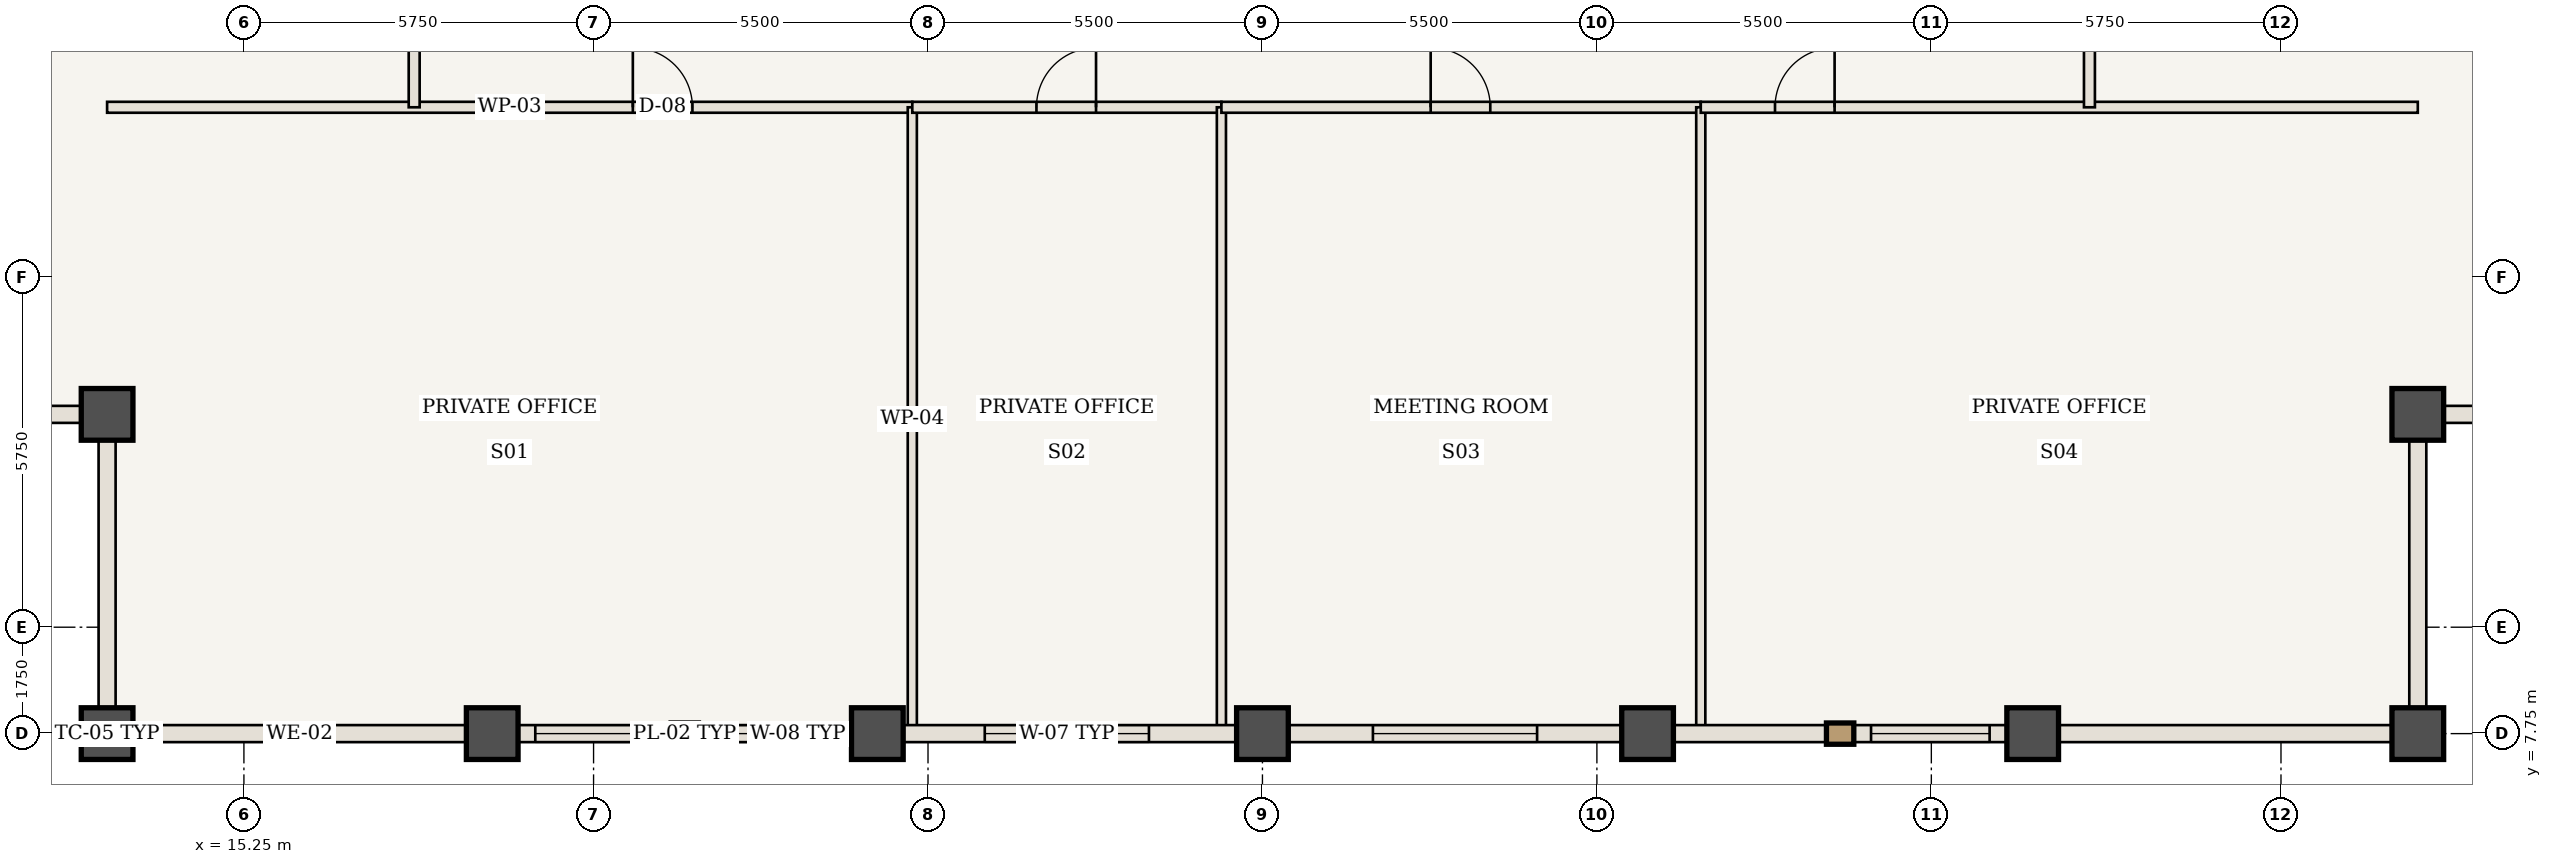
"""IFC4 building model, lengths in metres.
Left out: names, types, materials, properties, quantities, classifications, styles, units other than length and angle.
Written with IfcOpenShell. Run it as: python <this file> out.ifc"""

import sys

from ifc_helpers import new_model, si_unit, direction, frame, frame_2d, origin, origin_2d, place, context, subcontext, project, spatial, rectangle, extrude, element, fill, save


model = new_model("IFC4")
c1 = context("Model", 3, precision=1e-05, world=origin(), true_north=direction((0.0, 1.0)))
c2 = subcontext(c1, "Body", "Model", "MODEL_VIEW")
j1 = project(units=[si_unit("LENGTHUNIT", "METRE"), si_unit("PLANEANGLEUNIT", "RADIAN")], contexts=[c1])
p1 = place(None, origin())
s1 = spatial("IfcSite", under=j1, at=p1, CompositionType="ELEMENT")
p2 = place(p1, origin())
s2 = spatial("IfcBuilding", under=s1, at=p2, CompositionType="ELEMENT")
p3 = place(p2, frame((0.0, 0.0, 198.45)))
s3 = spatial("IfcBuildingStorey", under=s2, at=p3, CompositionType="ELEMENT", Elevation=198.45)
for number, where, z_axis, x_axis in (
    (1, (13.0, 7.75, 0.0), (0.0, 0.0, 1.0), (1.0, 0.0, 0.0)),
    (2, (13.0, 13.0, 0.0), (0.0, 0.0, 1.0), (1.0, 0.0, 0.0)),
    (3, (51.0, 7.75, 0.0), (0.0, 0.0, 1.0), (1.0, 0.0, 0.0)),
    (4, (51.0, 13.0, 0.0), (0.0, 0.0, 1.0), (1.0, 0.0, 0.0)),
    (5, (19.333, 7.75, 0.0), (0.0, 0.0, 1.0), (1.0, 0.0, 0.0)),
    (6, (25.667, 7.75, 0.0), (0.0, 0.0, 1.0), (1.0, 0.0, 0.0)),
    (7, (32.0, 7.75, 0.0), (0.0, 0.0, 1.0), (1.0, 0.0, 0.0)),
    (8, (38.333, 7.75, 0.0), (0.0, 0.0, 1.0), (1.0, 0.0, 0.0)),
    (9, (44.667, 7.75, 0.0), (0.0, 0.0, 1.0), (1.0, 0.0, 0.0)),
):
    element("IfcColumn", number, at=place(p3, frame(where, z_axis=z_axis, x_axis=x_axis)), inside=s3, PredefinedType="COLUMN", context=c2, shape_type="SweptSolid", body=[
        extrude(rectangle(XDim=0.85, YDim=0.85, at=origin_2d()), origin(), (0.0, 0.0, 1.0), 3.85),
    ])
p4 = place(p3, frame((13.0, 18.05, 0.0), z_axis=(0.0, 0.0, 1.0), x_axis=(1.0, 0.0, 0.0)))
e10 = element("IfcWall", 10, at=p4, inside=s3, PredefinedType="STANDARD", context=c2, shape_type="SweptSolid", body=[
    extrude(rectangle(XDim=13.242, YDim=0.18, at=frame_2d((6.621, 0.0))), origin(), (0.0, 0.0, 1.0), 3.685),
])
p5 = place(p4, frame((8.646, 0.0, 0.0)))
e11 = element("IfcOpeningElement", 11, at=p5, cuts=e10, PredefinedType="OPENING", context=c2, shape_type="SweptSolid", body=[
    extrude(rectangle(XDim=0.98, YDim=2.2, at=frame_2d((0.49, 1.1))), frame((0.0, 0.1, 0.0), z_axis=(0.0, -1.0, 0.0), x_axis=(1.0, 0.0, 0.0)), (0.0, 0.0, 1.0), 0.2),
])
p6 = place(p3, frame((26.242, 7.81, 0.0), z_axis=(0.0, 0.0, 1.0), x_axis=(0.0, 1.0, 0.0)))
e12 = element("IfcWall", 12, at=p6, inside=s3, PredefinedType="STANDARD", context=c2, shape_type="SweptSolid", body=[
    extrude(rectangle(XDim=10.24, YDim=0.15, at=frame_2d((5.12, 0.0))), origin(), (0.0, 0.0, 1.0), 3.685),
])
p7 = place(p3, frame((26.242, 18.05, 0.0), z_axis=(0.0, 0.0, 1.0), x_axis=(1.0, 0.0, 0.0)))
e13 = element("IfcWall", 13, at=p7, inside=s3, PredefinedType="STANDARD", context=c2, shape_type="SweptSolid", body=[
    extrude(rectangle(XDim=5.083, YDim=0.18, at=frame_2d((2.542, 0.0))), origin(), (0.0, 0.0, 1.0), 3.685),
])
p8 = place(p7, frame((2.042, 0.0, 0.0)))
e14 = element("IfcOpeningElement", 14, at=p8, cuts=e13, PredefinedType="OPENING", context=c2, shape_type="SweptSolid", body=[
    extrude(rectangle(XDim=0.98, YDim=2.2, at=frame_2d((0.49, 1.1))), frame((0.0, 0.1, 0.0), z_axis=(0.0, -1.0, 0.0), x_axis=(1.0, 0.0, 0.0)), (0.0, 0.0, 1.0), 0.2),
])
p9 = place(p3, frame((31.325, 7.81, 0.0), z_axis=(0.0, 0.0, 1.0), x_axis=(0.0, 1.0, 0.0)))
e15 = element("IfcWall", 15, at=p9, inside=s3, PredefinedType="STANDARD", context=c2, shape_type="SweptSolid", body=[
    extrude(rectangle(XDim=10.24, YDim=0.15, at=frame_2d((5.12, 0.0))), origin(), (0.0, 0.0, 1.0), 3.685),
])
p10 = place(p3, frame((31.325, 18.05, 0.0), z_axis=(0.0, 0.0, 1.0), x_axis=(1.0, 0.0, 0.0)))
e16 = element("IfcWall", 16, at=p10, inside=s3, PredefinedType="STANDARD", context=c2, shape_type="SweptSolid", body=[
    extrude(rectangle(XDim=7.883, YDim=0.18, at=frame_2d((3.942, 0.0))), origin(), (0.0, 0.0, 1.0), 3.685),
])
p11 = place(p10, frame((3.442, 0.0, 0.0)))
e17 = element("IfcOpeningElement", 17, at=p11, cuts=e16, PredefinedType="OPENING", context=c2, shape_type="SweptSolid", body=[
    extrude(rectangle(XDim=0.98, YDim=2.2, at=frame_2d((0.49, 1.1))), frame((0.0, 0.1, 0.0), z_axis=(0.0, -1.0, 0.0), x_axis=(1.0, 0.0, 0.0)), (0.0, 0.0, 1.0), 0.2),
])
p12 = place(p3, frame((39.208, 7.81, 0.0), z_axis=(0.0, 0.0, 1.0), x_axis=(0.0, 1.0, 0.0)))
e18 = element("IfcWall", 18, at=p12, inside=s3, PredefinedType="STANDARD", context=c2, shape_type="SweptSolid", body=[
    extrude(rectangle(XDim=10.24, YDim=0.15, at=frame_2d((5.12, 0.0))), origin(), (0.0, 0.0, 1.0), 3.685),
])
p13 = place(p3, frame((39.208, 18.05, 0.0), z_axis=(0.0, 0.0, 1.0), x_axis=(1.0, 0.0, 0.0)))
e19 = element("IfcWall", 19, at=p13, inside=s3, PredefinedType="STANDARD", context=c2, shape_type="SweptSolid", body=[
    extrude(rectangle(XDim=11.792, YDim=0.18, at=frame_2d((5.896, 0.0))), origin(), (0.0, 0.0, 1.0), 3.685),
])
p14 = place(p13, frame((1.221, 0.0, 0.0)))
e20 = element("IfcOpeningElement", 20, at=p14, cuts=e19, PredefinedType="OPENING", context=c2, shape_type="SweptSolid", body=[
    extrude(rectangle(XDim=0.98, YDim=2.2, at=frame_2d((0.49, 1.1))), frame((0.0, 0.1, 0.0), z_axis=(0.0, -1.0, 0.0), x_axis=(1.0, 0.0, 0.0)), (0.0, 0.0, 1.0), 0.2),
])
p15 = place(p3, frame((18.05, 18.05, 0.0), z_axis=(0.0, 0.0, 1.0), x_axis=(0.0, 1.0, 0.0)))
e21 = element("IfcWall", 21, at=p15, inside=s3, PredefinedType="STANDARD", context=c2, shape_type="SweptSolid", body=[
    extrude(rectangle(XDim=12.825, YDim=0.18, at=frame_2d((6.413, 0.0))), origin(), (0.0, 0.0, 1.0), 3.685),
])
p16 = place(p15, frame((5.913, 0.0, 0.0)))
e22 = element("IfcOpeningElement", 22, at=p16, cuts=e21, PredefinedType="OPENING", context=c2, shape_type="SweptSolid", body=[
    extrude(rectangle(XDim=0.98, YDim=2.2, at=frame_2d((0.49, 1.1))), frame((0.0, 0.1, 0.0), z_axis=(0.0, -1.0, 0.0), x_axis=(1.0, 0.0, 0.0)), (0.0, 0.0, 1.0), 0.2),
])
p17 = place(p3, frame((45.6, 18.05, 0.0), z_axis=(0.0, 0.0, 1.0), x_axis=(0.0, 1.0, 0.0)))
e23 = element("IfcWall", 23, at=p17, inside=s3, PredefinedType="STANDARD", context=c2, shape_type="SweptSolid", body=[
    extrude(rectangle(XDim=12.7, YDim=0.18, at=frame_2d((6.35, 0.0))), origin(), (0.0, 0.0, 1.0), 3.685),
])
p18 = place(p17, frame((5.85, 0.0, 0.0)))
e24 = element("IfcOpeningElement", 24, at=p18, cuts=e23, PredefinedType="OPENING", context=c2, shape_type="SweptSolid", body=[
    extrude(rectangle(XDim=0.98, YDim=2.2, at=frame_2d((0.49, 1.1))), frame((0.0, 0.1, 0.0), z_axis=(0.0, -1.0, 0.0), x_axis=(1.0, 0.0, 0.0)), (0.0, 0.0, 1.0), 0.2),
])
p19 = place(p3, frame((19.333, 7.75, 0.0), z_axis=(0.0, 0.0, 1.0), x_axis=(-1.0, 0.0, 0.0)))
e25 = element("IfcWall", 25, at=p19, inside=s3, PredefinedType="USERDEFINED", context=c2, shape_type="SweptSolid", body=[
    extrude(rectangle(XDim=6.333, YDim=0.28, at=frame_2d((3.167, 0.0))), origin(), (0.0, 0.0, 1.0), 2.985),
])
p20 = place(p3, frame((25.667, 7.75, 0.0), z_axis=(0.0, 0.0, 1.0), x_axis=(-1.0, 0.0, 0.0)))
e26 = element("IfcWall", 26, at=p20, inside=s3, PredefinedType="USERDEFINED", context=c2, shape_type="SweptSolid", body=[
    extrude(rectangle(XDim=6.333, YDim=0.28, at=frame_2d((3.167, 0.0))), origin(), (0.0, 0.0, 1.0), 2.985),
])
p21 = place(p20, frame((0.708, 0.0, 0.85)))
e27 = element("IfcOpeningElement", 27, at=p21, cuts=e26, PredefinedType="OPENING", context=c2, shape_type="SweptSolid", body=[
    extrude(rectangle(XDim=1.95, YDim=1.935, at=frame_2d((0.975, 0.968))), frame((0.0, 0.15, 0.0), z_axis=(0.0, -1.0, 0.0), x_axis=(1.0, 0.0, 0.0)), (0.0, 0.0, 1.0), 0.3),
])
p22 = place(p20, frame((3.675, 0.0, 0.85)))
e28 = element("IfcOpeningElement", 28, at=p22, cuts=e26, PredefinedType="OPENING", context=c2, shape_type="SweptSolid", body=[
    extrude(rectangle(XDim=1.95, YDim=1.935, at=frame_2d((0.975, 0.968))), frame((0.0, 0.15, 0.0), z_axis=(0.0, -1.0, 0.0), x_axis=(1.0, 0.0, 0.0)), (0.0, 0.0, 1.0), 0.3),
])
p23 = place(p3, frame((32.0, 7.75, 0.0), z_axis=(0.0, 0.0, 1.0), x_axis=(-1.0, 0.0, 0.0)))
e29 = element("IfcWall", 29, at=p23, inside=s3, PredefinedType="USERDEFINED", context=c2, shape_type="SweptSolid", body=[
    extrude(rectangle(XDim=6.333, YDim=0.28, at=frame_2d((3.167, 0.0))), origin(), (0.0, 0.0, 1.0), 2.985),
])
p24 = place(p23, frame((1.867, 0.0, 0.85)))
e30 = element("IfcOpeningElement", 30, at=p24, cuts=e29, PredefinedType="OPENING", context=c2, shape_type="SweptSolid", body=[
    extrude(rectangle(XDim=2.7, YDim=1.935, at=frame_2d((1.35, 0.968))), frame((0.0, 0.15, 0.0), z_axis=(0.0, -1.0, 0.0), x_axis=(1.0, 0.0, 0.0)), (0.0, 0.0, 1.0), 0.3),
])
p25 = place(p3, frame((38.333, 7.75, 0.0), z_axis=(0.0, 0.0, 1.0), x_axis=(-1.0, 0.0, 0.0)))
e31 = element("IfcWall", 31, at=p25, inside=s3, PredefinedType="USERDEFINED", context=c2, shape_type="SweptSolid", body=[
    extrude(rectangle(XDim=6.333, YDim=0.28, at=frame_2d((3.167, 0.0))), origin(), (0.0, 0.0, 1.0), 2.985),
])
p26 = place(p25, frame((1.817, 0.0, 0.85)))
e32 = element("IfcOpeningElement", 32, at=p26, cuts=e31, PredefinedType="OPENING", context=c2, shape_type="SweptSolid", body=[
    extrude(rectangle(XDim=2.7, YDim=1.935, at=frame_2d((1.35, 0.968))), frame((0.0, 0.15, 0.0), z_axis=(0.0, -1.0, 0.0), x_axis=(1.0, 0.0, 0.0)), (0.0, 0.0, 1.0), 0.3),
])
p27 = place(p3, frame((44.667, 7.75, 0.0), z_axis=(0.0, 0.0, 1.0), x_axis=(-1.0, 0.0, 0.0)))
e33 = element("IfcWall", 33, at=p27, inside=s3, PredefinedType="USERDEFINED", context=c2, shape_type="SweptSolid", body=[
    extrude(rectangle(XDim=6.333, YDim=0.28, at=frame_2d((3.167, 0.0))), origin(), (0.0, 0.0, 1.0), 2.985),
])
p28 = place(p27, frame((0.708, 0.0, 0.85)))
e34 = element("IfcOpeningElement", 34, at=p28, cuts=e33, PredefinedType="OPENING", context=c2, shape_type="SweptSolid", body=[
    extrude(rectangle(XDim=1.95, YDim=1.935, at=frame_2d((0.975, 0.968))), frame((0.0, 0.15, 0.0), z_axis=(0.0, -1.0, 0.0), x_axis=(1.0, 0.0, 0.0)), (0.0, 0.0, 1.0), 0.3),
])
p29 = place(p3, frame((51.0, 7.75, 0.0), z_axis=(0.0, 0.0, 1.0), x_axis=(-1.0, 0.0, 0.0)))
e35 = element("IfcWall", 35, at=p29, inside=s3, PredefinedType="USERDEFINED", context=c2, shape_type="SweptSolid", body=[
    extrude(rectangle(XDim=6.333, YDim=0.28, at=frame_2d((3.167, 0.0))), origin(), (0.0, 0.0, 1.0), 2.985),
])
for number, where, z_axis, x_axis in (
    (36, (13.0, 7.75, 0.0), (0.0, 0.0, 1.0), (0.0, 1.0, 0.0)),
    (37, (13.0, 13.0, 0.0), (0.0, 0.0, 1.0), (-1.0, 0.0, 0.0)),
    (38, (51.0, 13.0, 0.0), (0.0, 0.0, 1.0), (0.0, -1.0, 0.0)),
    (39, (56.25, 13.0, 0.0), (0.0, 0.0, 1.0), (-1.0, 0.0, 0.0)),
):
    element("IfcWall", number, at=place(p3, frame(where, z_axis=z_axis, x_axis=x_axis)), inside=s3, PredefinedType="USERDEFINED", context=c2, shape_type="SweptSolid", body=[
        extrude(rectangle(XDim=5.25, YDim=0.28, at=frame_2d((2.625, 0.0))), origin(), (0.0, 0.0, 1.0), 2.985),
    ])
p30 = place(p5, origin())
e40 = element("IfcDoor", 40, at=p30, inside=s3, OperationType="SINGLE_SWING_LEFT", PredefinedType="DOOR", context=c2, shape_type="SweptSolid", body=[
    extrude(rectangle(XDim=0.98, YDim=2.2, at=frame_2d((0.49, 1.1))), frame((0.0, 0.025, 0.0), z_axis=(0.0, -1.0, 0.0), x_axis=(1.0, 0.0, 0.0)), (0.0, 0.0, 1.0), 0.05),
])
fill(e11, e40)
p31 = place(p8, origin())
e41 = element("IfcDoor", 41, at=p31, inside=s3, OperationType="SINGLE_SWING_RIGHT", PredefinedType="DOOR", context=c2, shape_type="SweptSolid", body=[
    extrude(rectangle(XDim=0.98, YDim=2.2, at=frame_2d((0.49, 1.1))), frame((0.0, 0.025, 0.0), z_axis=(0.0, -1.0, 0.0), x_axis=(1.0, 0.0, 0.0)), (0.0, 0.0, 1.0), 0.05),
])
fill(e14, e41)
p32 = place(p11, origin())
e42 = element("IfcDoor", 42, at=p32, inside=s3, OperationType="SINGLE_SWING_LEFT", PredefinedType="DOOR", context=c2, shape_type="SweptSolid", body=[
    extrude(rectangle(XDim=0.98, YDim=2.2, at=frame_2d((0.49, 1.1))), frame((0.0, 0.025, 0.0), z_axis=(0.0, -1.0, 0.0), x_axis=(1.0, 0.0, 0.0)), (0.0, 0.0, 1.0), 0.05),
])
fill(e17, e42)
p33 = place(p14, origin())
e43 = element("IfcDoor", 43, at=p33, inside=s3, OperationType="SINGLE_SWING_RIGHT", PredefinedType="DOOR", context=c2, shape_type="SweptSolid", body=[
    extrude(rectangle(XDim=0.98, YDim=2.2, at=frame_2d((0.49, 1.1))), frame((0.0, 0.025, 0.0), z_axis=(0.0, -1.0, 0.0), x_axis=(1.0, 0.0, 0.0)), (0.0, 0.0, 1.0), 0.05),
])
fill(e20, e43)
p34 = place(p21, origin())
e44 = element("IfcWindow", 44, at=p34, inside=s3, PartitioningType="SINGLE_PANEL", PredefinedType="WINDOW", context=c2, shape_type="SweptSolid", body=[
    extrude(rectangle(XDim=1.95, YDim=1.935, at=frame_2d((0.975, 0.968))), frame((0.0, 0.03, 0.0), z_axis=(0.0, -1.0, 0.0), x_axis=(1.0, 0.0, 0.0)), (0.0, 0.0, 1.0), 0.06),
])
fill(e27, e44)
p35 = place(p22, origin())
e45 = element("IfcWindow", 45, at=p35, inside=s3, PartitioningType="SINGLE_PANEL", PredefinedType="WINDOW", context=c2, shape_type="SweptSolid", body=[
    extrude(rectangle(XDim=1.95, YDim=1.935, at=frame_2d((0.975, 0.968))), frame((0.0, 0.03, 0.0), z_axis=(0.0, -1.0, 0.0), x_axis=(1.0, 0.0, 0.0)), (0.0, 0.0, 1.0), 0.06),
])
fill(e28, e45)
p36 = place(p24, origin())
e46 = element("IfcWindow", 46, at=p36, inside=s3, PartitioningType="SINGLE_PANEL", PredefinedType="WINDOW", context=c2, shape_type="SweptSolid", body=[
    extrude(rectangle(XDim=2.7, YDim=1.935, at=frame_2d((1.35, 0.968))), frame((0.0, 0.03, 0.0), z_axis=(0.0, -1.0, 0.0), x_axis=(1.0, 0.0, 0.0)), (0.0, 0.0, 1.0), 0.06),
])
fill(e30, e46)
p37 = place(p26, origin())
e47 = element("IfcWindow", 47, at=p37, inside=s3, PartitioningType="SINGLE_PANEL", PredefinedType="WINDOW", context=c2, shape_type="SweptSolid", body=[
    extrude(rectangle(XDim=2.7, YDim=1.935, at=frame_2d((1.35, 0.968))), frame((0.0, 0.03, 0.0), z_axis=(0.0, -1.0, 0.0), x_axis=(1.0, 0.0, 0.0)), (0.0, 0.0, 1.0), 0.06),
])
fill(e32, e47)
p38 = place(p28, origin())
e48 = element("IfcWindow", 48, at=p38, inside=s3, PartitioningType="SINGLE_PANEL", PredefinedType="WINDOW", context=c2, shape_type="SweptSolid", body=[
    extrude(rectangle(XDim=1.95, YDim=1.935, at=frame_2d((0.975, 0.968))), frame((0.0, 0.03, 0.0), z_axis=(0.0, -1.0, 0.0), x_axis=(1.0, 0.0, 0.0)), (0.0, 0.0, 1.0), 0.06),
])
fill(e34, e48)
save(model, sys.argv[1])
